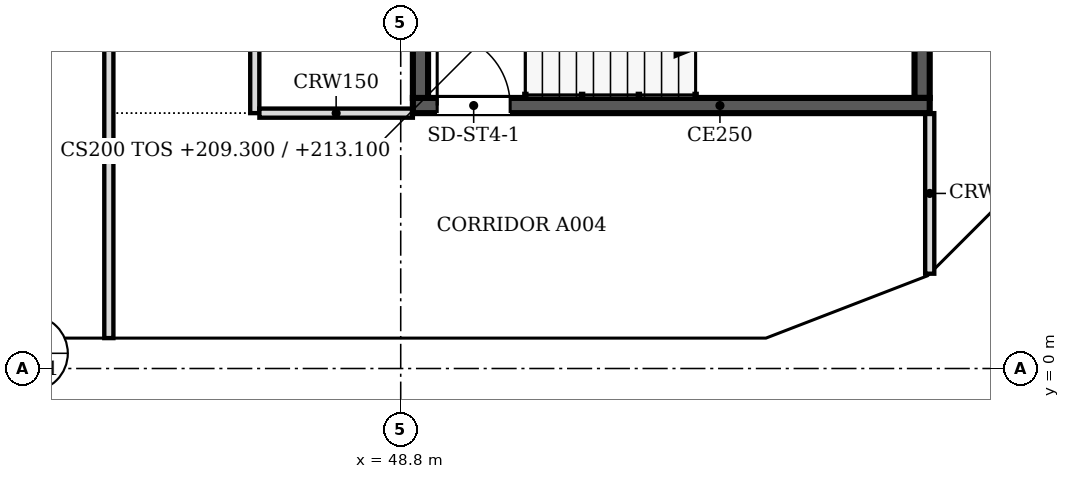
"""IFC4 building model, lengths in metres.
Left out: names, types, materials, properties, quantities, classifications, styles, units other than length and angle.
Written with IfcOpenShell. Run it as: python <this file> out.ifc"""

import sys

from ifc_helpers import new_model, si_unit, direction, frame, frame_2d, origin, place, context, subcontext, project, spatial, polyline, rectangle, outline, extrude, faceted_brep, source, transform, mapped, element, fill, save


model = new_model("IFC4")
c1 = context("Model", 3, precision=1e-05, world=origin(), true_north=direction((0.0, 1.0)))
c2 = subcontext(c1, "Body", "Model", "MODEL_VIEW")
j1 = project(units=[si_unit("LENGTHUNIT", "METRE"), si_unit("PLANEANGLEUNIT", "RADIAN")], contexts=[c1])
p1 = place(None, origin())
s1 = spatial("IfcSite", under=j1, at=p1, CompositionType="ELEMENT")
p2 = place(p1, origin())
s2 = spatial("IfcBuilding", under=s1, at=p2, CompositionType="ELEMENT")
p3 = place(p2, frame((0.0, 0.0, 209.3)))
s3 = spatial("IfcBuildingStorey", under=s2, at=p3, CompositionType="ELEMENT", Elevation=209.3)
m1 = source(origin(), c2, "Body", "SweptSolid", [
    extrude(outline(polyline([(3.05, 0.0), (6.1, 3.8), (3.05, 7.6), (0.0, 3.8), (3.05, 0.0)])), frame((0.0, 0.25, 0.0), z_axis=(0.0, -1.0, 0.0), x_axis=(1.0, 0.0, 0.0)), (0.0, 0.0, 1.0), 0.5),
])
p4 = place(p3, frame((42.7, 0.25, -3.8), z_axis=(0.0, 0.0, 1.0), x_axis=(1.0, 0.0, 0.0)))
e1 = element("IfcWall", 1, at=p4, inside=s3, PredefinedType="SOLIDWALL", context=c2, shape_type="MappedRepresentation", body=[
    mapped(m1, transform((0.0, 0.0, 0.0), scale=1.0)),
])
m2 = source(origin(), c2, "Body", "SweptSolid", [
    extrude(outline(polyline([(3.05, 0.399), (5.78, 3.8), (3.05, 7.201), (0.321, 3.8), (3.05, 0.399)])), frame((0.0, 0.26, 0.0), z_axis=(0.0, -1.0, 0.0), x_axis=(1.0, 0.0, 0.0)), (0.0, 0.0, 1.0), 0.52),
])
p5 = place(p4, origin())
e2 = element("IfcOpeningElement", 2, at=p5, cuts=e1, PredefinedType="OPENING", context=c2, shape_type="MappedRepresentation", body=[
    mapped(m2, transform((0.0, 0.0, 0.0), scale=1.0)),
])
m3 = source(origin(), c2, "Body", "Brep", [
    faceted_brep([(3.05, -0.25, 0.0), (6.053, -0.25, 3.8), (3.05, -0.25, 7.6), (0.0, -0.25, 3.8), (0.0, 0.25, 3.8), (3.05, 0.25, 7.6), (6.007, 0.25, 3.859), (6.007, 0.25, 3.741), (3.05, 0.25, 0.0), (6.053, 0.0, 3.8)], [[[0, 1, 2, 3]], [[4, 5, 6, 7, 8]], [[8, 7, 9, 1, 0]], [[6, 5, 2, 1, 9]], [[5, 4, 3, 2]], [[4, 8, 0, 3]], [[9, 7, 6]]]),
])
p6 = place(p3, frame((48.8, 0.25, -3.8), z_axis=(0.0, 0.0, 1.0), x_axis=(1.0, 0.0, 0.0)))
e3 = element("IfcWall", 3, at=p6, inside=s3, PredefinedType="SOLIDWALL", context=c2, shape_type="MappedRepresentation", body=[
    mapped(m3, transform((0.0, 0.0, 0.0), scale=1.0)),
])
m4 = source(origin(), c2, "Body", "SweptSolid", [
    extrude(outline(polyline([(3.049, 0.401), (5.735, 3.8), (3.049, 7.199), (0.321, 3.8), (3.049, 0.401)])), frame((0.0, 0.26, 0.0), z_axis=(0.0, -1.0, 0.0), x_axis=(1.0, 0.0, 0.0)), (0.0, 0.0, 1.0), 0.52),
])
p7 = place(p6, origin())
e4 = element("IfcOpeningElement", 4, at=p7, cuts=e3, PredefinedType="OPENING", context=c2, shape_type="MappedRepresentation", body=[
    mapped(m4, transform((0.0, 0.0, 0.0), scale=1.0)),
])
m5 = source(origin(), c2, "Body", "Brep", [
    faceted_brep([(2.95, -0.25, 0.0), (3.003, -0.25, 0.068), (3.003, -0.25, 7.532), (2.95, -0.25, 7.6), (0.0, -0.25, 3.8), (0.047, 0.25, 3.86), (2.898, 0.25, 7.532), (2.898, 0.25, 0.068), (0.047, 0.25, 3.74), (2.95, 0.0, 0.0), (2.95, 0.0, 7.6), (0.0, 0.0, 3.8)], [[[0, 1, 2, 3, 4]], [[5, 6, 7, 8]], [[1, 0, 9]], [[10, 3, 2]], [[6, 5, 11, 4, 3, 10]], [[8, 7, 9, 0, 4, 11]], [[8, 11, 5]], [[1, 9, 7, 6, 10, 2]]]),
])
p8 = place(p3, frame((54.854, 0.25, -3.8), z_axis=(0.0, 0.0, 1.0), x_axis=(0.932970071518, 0.359953949349, 0.0)))
e5 = element("IfcWall", 5, at=p8, inside=s3, PredefinedType="SOLIDWALL", context=c2, shape_type="MappedRepresentation", body=[
    mapped(m5, transform((0.0, 0.0, 0.0), scale=1.0)),
])
m6 = source(origin(), c2, "Body", "SweptSolid", [
    extrude(outline(polyline([(2.75, 6.935), (0.316, 3.8), (2.75, 0.665), (2.75, 6.935)])), frame((0.0, 0.26, 0.0), z_axis=(0.0, -1.0, 0.0), x_axis=(1.0, 0.0, 0.0)), (0.0, 0.0, 1.0), 0.52),
])
p9 = place(p8, origin())
e6 = element("IfcOpeningElement", 6, at=p9, cuts=e5, PredefinedType="OPENING", context=c2, shape_type="MappedRepresentation", body=[
    mapped(m6, transform((0.0, 0.0, 0.0), scale=1.0)),
])
m7 = source(origin(), c2, "Body", "Brep", [
    faceted_brep([(0.053, -0.25, 0.0), (2.997, -0.25, 3.8), (0.053, -0.25, 7.6), (0.0, -0.25, 7.532), (0.0, -0.25, 0.068), (0.106, 0.25, 7.532), (2.944, 0.25, 3.868), (2.944, 0.25, 3.732), (0.106, 0.25, 0.068), (2.997, 0.0, 3.8), (0.053, 0.0, 0.0), (0.053, 0.0, 7.6)], [[[0, 1, 2, 3, 4]], [[5, 6, 7, 8]], [[8, 7, 9, 1, 0, 10]], [[6, 5, 11, 2, 1, 9]], [[3, 2, 11]], [[10, 0, 4]], [[8, 10, 4, 3, 11, 5]], [[9, 7, 6]]]),
])
p10 = place(p3, frame((57.569, 1.274, -3.8), z_axis=(0.0, 0.0, 1.0), x_axis=(0.707066050402, 0.707147509625, 0.0)))
e7 = element("IfcWall", 7, at=p10, inside=s3, PredefinedType="SOLIDWALL", context=c2, shape_type="MappedRepresentation", body=[
    mapped(m7, transform((0.0, 0.0, 0.0), scale=1.0)),
])
m8 = source(origin(), c2, "Body", "SweptSolid", [
    extrude(outline(polyline([(0.253, 0.666), (2.681, 3.8), (0.253, 6.934), (0.253, 0.666)])), frame((0.0, 0.26, 0.0), z_axis=(0.0, -1.0, 0.0), x_axis=(1.0, 0.0, 0.0)), (0.0, 0.0, 1.0), 0.52),
])
p11 = place(p10, origin())
e8 = element("IfcOpeningElement", 8, at=p11, cuts=e7, PredefinedType="OPENING", context=c2, shape_type="MappedRepresentation", body=[
    mapped(m8, transform((0.0, 0.0, 0.0), scale=1.0)),
])
p12 = place(p2, frame((0.0, 0.0, 213.1)))
s4 = spatial("IfcBuildingStorey", under=s2, at=p12, CompositionType="ELEMENT", Elevation=213.1)
m9 = source(origin(), c2, "Body", "SweptSolid", [
    extrude(outline(polyline([(3.05, 0.0), (6.1, 3.8), (3.05, 7.6), (0.0, 3.8), (3.05, 0.0)])), frame((0.0, 0.25, 0.0), z_axis=(0.0, -1.0, 0.0), x_axis=(1.0, 0.0, 0.0)), (0.0, 0.0, 1.0), 0.5),
])
p13 = place(p12, frame((39.65, 0.25, -3.8), z_axis=(0.0, 0.0, 1.0), x_axis=(1.0, 0.0, 0.0)))
e9 = element("IfcWall", 9, at=p13, inside=s4, PredefinedType="SOLIDWALL", context=c2, shape_type="MappedRepresentation", body=[
    mapped(m9, transform((0.0, 0.0, 0.0), scale=1.0)),
])
m10 = source(origin(), c2, "Body", "SweptSolid", [
    extrude(outline(polyline([(3.05, 0.399), (5.78, 3.8), (3.05, 7.2), (0.321, 3.8), (3.05, 0.399)])), frame((0.0, 0.26, 0.0), z_axis=(0.0, -1.0, 0.0), x_axis=(1.0, 0.0, 0.0)), (0.0, 0.0, 1.0), 0.52),
])
p14 = place(p13, origin())
e10 = element("IfcOpeningElement", 10, at=p14, cuts=e9, PredefinedType="OPENING", context=c2, shape_type="MappedRepresentation", body=[
    mapped(m10, transform((0.0, 0.0, 0.0), scale=1.0)),
])
p15 = place(p12, frame((45.75, 0.25, -3.8), z_axis=(0.0, 0.0, 1.0), x_axis=(1.0, 0.0, 0.0)))
e11 = element("IfcWall", 11, at=p15, inside=s4, PredefinedType="SOLIDWALL", context=c2, shape_type="MappedRepresentation", body=[
    mapped(m9, transform((0.0, 0.0, 0.0), scale=1.0)),
])
p16 = place(p15, origin())
e12 = element("IfcOpeningElement", 12, at=p16, cuts=e11, PredefinedType="OPENING", context=c2, shape_type="MappedRepresentation", body=[
    mapped(m10, transform((0.0, 0.0, 0.0), scale=1.0)),
])
m11 = source(origin(), c2, "Body", "Brep", [
    faceted_brep([(3.003, -0.25, 0.0), (3.05, -0.25, 0.06), (3.05, -0.25, 7.54), (3.003, -0.25, 7.6), (0.0, -0.25, 3.8), (0.0, 0.25, 3.8), (2.957, 0.25, 7.541), (2.957, 0.25, 0.059), (3.003, 0.0, 0.0), (3.003, 0.0, 7.6)], [[[0, 1, 2, 3, 4]], [[5, 6, 7]], [[1, 0, 8]], [[9, 3, 2]], [[6, 5, 4, 3, 9]], [[5, 7, 8, 0, 4]], [[1, 8, 7, 6, 9, 2]]]),
])
p17 = place(p12, frame((51.85, 0.25, -3.8), z_axis=(0.0, 0.0, 1.0), x_axis=(1.0, 0.0, 0.0)))
e13 = element("IfcWall", 13, at=p17, inside=s4, PredefinedType="SOLIDWALL", context=c2, shape_type="MappedRepresentation", body=[
    mapped(m11, transform((0.0, 0.0, 0.0), scale=1.0)),
])
m12 = source(origin(), c2, "Body", "SweptSolid", [
    extrude(outline(polyline([(2.803, 6.944), (0.319, 3.8), (2.803, 0.656), (2.803, 6.944)])), frame((0.0, 0.26, 0.0), z_axis=(0.0, -1.0, 0.0), x_axis=(1.0, 0.0, 0.0)), (0.0, 0.0, 1.0), 0.52),
])
p18 = place(p17, origin())
e14 = element("IfcOpeningElement", 14, at=p18, cuts=e13, PredefinedType="OPENING", context=c2, shape_type="MappedRepresentation", body=[
    mapped(m12, transform((0.0, 0.0, 0.0), scale=1.0)),
])
m13 = source(origin(), c2, "Body", "Brep", [
    faceted_brep([(0.047, -0.25, 0.0), (2.997, -0.25, 3.8), (0.047, -0.25, 7.6), (0.0, -0.25, 7.541), (0.0, -0.25, 0.059), (0.093, 0.25, 7.54), (2.944, 0.25, 3.868), (2.944, 0.25, 3.732), (0.093, 0.25, 0.06), (2.997, 0.0, 3.8), (0.047, 0.0, 0.0), (0.047, 0.0, 7.6)], [[[0, 1, 2, 3, 4]], [[5, 6, 7, 8]], [[8, 7, 9, 1, 0, 10]], [[6, 5, 11, 2, 1, 9]], [[3, 2, 11]], [[10, 0, 4]], [[8, 10, 4, 3, 11, 5]], [[7, 6, 9]]]),
])
p19 = place(p12, frame((54.81, 0.233, -3.8), z_axis=(0.0, 0.0, 1.0), x_axis=(0.932990326376, 0.359901446078, 0.0)))
e15 = element("IfcWall", 15, at=p19, inside=s4, PredefinedType="SOLIDWALL", context=c2, shape_type="MappedRepresentation", body=[
    mapped(m13, transform((0.0, 0.0, 0.0), scale=1.0)),
])
m14 = source(origin(), c2, "Body", "SweptSolid", [
    extrude(outline(polyline([(0.247, 0.665), (2.681, 3.8), (0.247, 6.935), (0.247, 0.665)])), frame((0.0, 0.26, 0.0), z_axis=(0.0, -1.0, 0.0), x_axis=(1.0, 0.0, 0.0)), (0.0, 0.0, 1.0), 0.52),
])
p20 = place(p19, origin())
e16 = element("IfcOpeningElement", 16, at=p20, cuts=e15, PredefinedType="OPENING", context=c2, shape_type="MappedRepresentation", body=[
    mapped(m14, transform((0.0, 0.0, 0.0), scale=1.0)),
])
m15 = source(origin(), c2, "Body", "Brep", [
    faceted_brep([(2.944, -0.25, 0.0), (2.997, -0.25, 0.068), (2.997, -0.25, 7.532), (2.944, -0.25, 7.6), (0.0, -0.25, 3.8), (0.053, 0.25, 3.868), (2.891, 0.25, 7.532), (2.891, 0.25, 0.068), (0.053, 0.25, 3.732), (2.944, 0.0, 0.0), (2.944, 0.0, 7.6), (0.0, 0.0, 3.8)], [[[0, 1, 2, 3, 4]], [[5, 6, 7, 8]], [[1, 0, 9]], [[10, 3, 2]], [[6, 5, 11, 4, 3, 10]], [[8, 7, 9, 0, 4, 11]], [[8, 11, 5]], [[1, 9, 7, 6, 10, 2]]]),
])
p21 = place(p12, frame((57.606, 1.312, -3.8), z_axis=(0.0, 0.0, 1.0), x_axis=(0.707147509625, 0.707066050402, 0.0)))
e17 = element("IfcWall", 17, at=p21, inside=s4, PredefinedType="SOLIDWALL", context=c2, shape_type="MappedRepresentation", body=[
    mapped(m15, transform((0.0, 0.0, 0.0), scale=1.0)),
])
m16 = source(origin(), c2, "Body", "SweptSolid", [
    extrude(outline(polyline([(2.744, 6.934), (0.316, 3.8), (2.744, 0.666), (2.744, 6.934)])), frame((0.0, 0.26, 0.0), z_axis=(0.0, -1.0, 0.0), x_axis=(1.0, 0.0, 0.0)), (0.0, 0.0, 1.0), 0.52),
])
p22 = place(p21, origin())
e18 = element("IfcOpeningElement", 18, at=p22, cuts=e17, PredefinedType="OPENING", context=c2, shape_type="MappedRepresentation", body=[
    mapped(m16, transform((0.0, 0.0, 0.0), scale=1.0)),
])
p23 = place(p3, frame((57.5, 4.325, 0.0), z_axis=(0.0, 0.0, 1.0), x_axis=(-1.0, 0.0, 0.0)))
e19 = element("IfcWall", 19, at=p23, inside=s3, PredefinedType="SOLIDWALL", context=c2, shape_type="SweptSolid", body=[
    extrude(rectangle(XDim=8.5, YDim=0.25, at=frame_2d((4.25, 0.0))), origin(), (0.0, 0.0, 1.0), 3.8),
])
m17 = source(origin(), c2, "Body", "SweptSolid", [
    extrude(rectangle(XDim=1.2, YDim=2.1, at=frame_2d((0.6, 1.05))), frame((0.0, 0.135, 0.0), z_axis=(0.0, -1.0, 0.0), x_axis=(1.0, 0.0, 0.0)), (0.0, 0.0, 1.0), 0.27),
])
p24 = place(p23, frame((6.9, 0.0, 0.0)))
e20 = element("IfcOpeningElement", 20, at=p24, cuts=e19, PredefinedType="OPENING", context=c2, shape_type="MappedRepresentation", body=[
    mapped(m17, transform((0.0, 0.0, 0.0), scale=1.0)),
])
for number, where, z_axis, x_axis in (
    (21, (49.125, 4.45, 0.0), (0.0, 0.0, 1.0), (0.0, 1.0, 0.0)),
    (22, (57.375, 7.85, 0.0), (0.0, 0.0, 1.0), (0.0, -1.0, 0.0)),
):
    element("IfcWall", number, at=place(p3, frame(where, z_axis=z_axis, x_axis=x_axis)), inside=s3, PredefinedType="SOLIDWALL", context=c2, shape_type="SweptSolid", body=[
        extrude(rectangle(XDim=3.4, YDim=0.25, at=frame_2d((1.7, 0.0))), origin(), (0.0, 0.0, 1.0), 3.8),
    ])
p25 = place(p3, frame((44.0, 0.5, 0.0), z_axis=(0.0, 0.0, 1.0), x_axis=(0.0, 1.0, 0.0)))
e23 = element("IfcWall", 23, at=p25, inside=s3, PredefinedType="PARTITIONING", context=c2, shape_type="SweptSolid", body=[
    extrude(rectangle(XDim=21.424, YDim=0.15, at=frame_2d((10.712, 0.0))), origin(), (0.0, 0.0, 1.0), 3.067),
])
m18 = source(origin(), c2, "Body", "SweptSolid", [
    extrude(rectangle(XDim=0.9, YDim=2.1, at=frame_2d((0.45, 1.05))), frame((0.0, 0.085, 0.0), z_axis=(0.0, -1.0, 0.0), x_axis=(1.0, 0.0, 0.0)), (0.0, 0.0, 1.0), 0.17),
])
p26 = place(p25, frame((16.601, 0.0, 0.0)))
e24 = element("IfcOpeningElement", 24, at=p26, cuts=e23, PredefinedType="OPENING", context=c2, shape_type="MappedRepresentation", body=[
    mapped(m18, transform((0.0, 0.0, 0.0), scale=1.0)),
])
p27 = place(p25, frame((7.7, 0.0, 0.0)))
e25 = element("IfcOpeningElement", 25, at=p27, cuts=e23, PredefinedType="OPENING", context=c2, shape_type="MappedRepresentation", body=[
    mapped(m18, transform((0.0, 0.0, 0.0), scale=1.0)),
])
p28 = place(p3, frame((57.5, 1.559, 0.0), z_axis=(0.0, 0.0, 1.0), x_axis=(0.0, 1.0, 0.0)))
e26 = element("IfcWall", 26, at=p28, inside=s3, PredefinedType="PARTITIONING", context=c2, shape_type="SweptSolid", body=[
    extrude(rectangle(XDim=2.641, YDim=0.15, at=frame_2d((1.32, 0.0))), origin(), (0.0, 0.0, 1.0), 3.067),
])
p29 = place(p3, frame((46.4, 21.924, 0.0), z_axis=(0.0, 0.0, 1.0), x_axis=(0.0, -1.0, 0.0)))
e27 = element("IfcWall", 27, at=p29, inside=s3, PredefinedType="PARTITIONING", context=c2, shape_type="SweptSolid", body=[
    extrude(rectangle(XDim=17.724, YDim=0.15, at=frame_2d((8.862, 0.0))), origin(), (0.0, 0.0, 1.0), 3.067),
])
p30 = place(p29, frame((1.923, 0.0, 0.0)))
e28 = element("IfcOpeningElement", 28, at=p30, cuts=e27, PredefinedType="OPENING", context=c2, shape_type="MappedRepresentation", body=[
    mapped(m18, transform((0.0, 0.0, 0.0), scale=1.0)),
])
p31 = place(p29, frame((10.824, 0.0, 0.0)))
e29 = element("IfcOpeningElement", 29, at=p31, cuts=e27, PredefinedType="OPENING", context=c2, shape_type="MappedRepresentation", body=[
    mapped(m18, transform((0.0, 0.0, 0.0), scale=1.0)),
])
p32 = place(p3, frame((46.476, 4.2, 0.0), z_axis=(0.0, 0.0, 1.0), x_axis=(1.0, 0.0, 0.0)))
e30 = element("IfcWall", 30, at=p32, inside=s3, PredefinedType="PARTITIONING", context=c2, shape_type="SweptSolid", body=[
    extrude(rectangle(XDim=2.524, YDim=0.15, at=frame_2d((1.262, 0.0))), origin(), (0.0, 0.0, 1.0), 3.067),
])
m19 = source(origin(), c2, "Body", "SweptSolid", [
    extrude(rectangle(XDim=1.2, YDim=2.1, at=frame_2d((0.6, 1.05))), frame((0.0, 0.025, 0.0), z_axis=(0.0, -1.0, 0.0), x_axis=(1.0, 0.0, 0.0)), (0.0, 0.0, 1.0), 0.05),
])
p33 = place(p24, origin())
e31 = element("IfcDoor", 31, at=p33, inside=s3, OperationType="SINGLE_SWING_RIGHT", PredefinedType="DOOR", context=c2, shape_type="MappedRepresentation", body=[
    mapped(m19, transform((0.0, 0.0, 0.0), scale=1.0)),
])
fill(e20, e31)
save(model, sys.argv[1])
